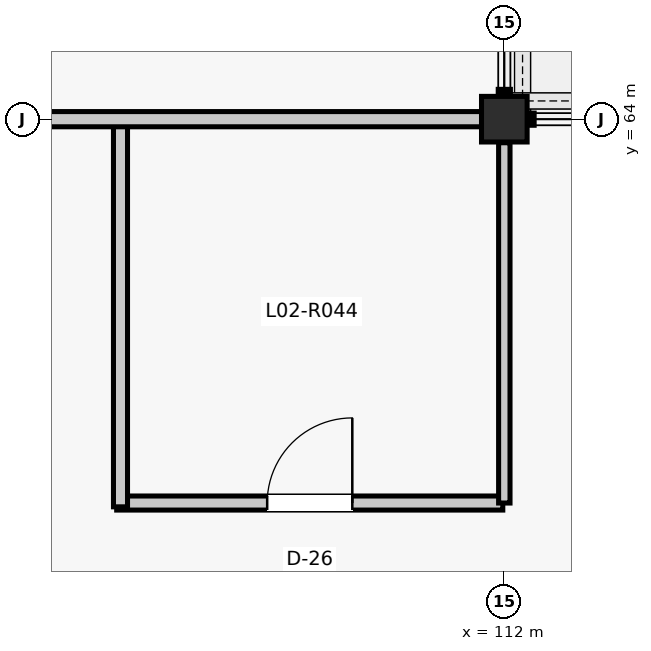
"""IFC4 building model, lengths in metres.
Left out: names, types, materials, properties, quantities, classifications, styles, units other than length and angle.
Written with IfcOpenShell. Run it as: python <this file> out.ifc"""

import sys

from ifc_helpers import new_model, si_unit, direction, frame, frame_2d, origin, origin_2d, place, context, subcontext, project, spatial, rectangle, extrude, element, fill, save


model = new_model("IFC4")
c1 = context("Model", 3, precision=1e-05, world=origin(), true_north=direction((0.0, 1.0)))
c2 = subcontext(c1, "Body", "Model", "MODEL_VIEW")
j1 = project(units=[si_unit("LENGTHUNIT", "METRE"), si_unit("PLANEANGLEUNIT", "RADIAN")], contexts=[c1])
p1 = place(None, origin())
s1 = spatial("IfcSite", under=j1, at=p1, CompositionType="ELEMENT")
p2 = place(p1, origin())
s2 = spatial("IfcBuilding", under=s1, at=p2, CompositionType="ELEMENT")
p3 = place(p2, frame((0.0, 0.0, 9.9)))
s3 = spatial("IfcBuildingStorey", under=s2, at=p3, CompositionType="ELEMENT", Elevation=9.9)
p4 = place(p3, frame((112.0, 64.0, 0.0), z_axis=(0.0, 0.0, 1.0), x_axis=(1.0, 0.0, 0.0)))
e1 = element("IfcColumn", 1, at=p4, inside=s3, PredefinedType="COLUMN", context=c2, shape_type="SweptSolid", body=[
    extrude(rectangle(XDim=0.6, YDim=0.6, at=origin_2d()), origin(), (0.0, 0.0, 1.0), 3.96),
])
p5 = place(p3, frame((106.9, 58.95, 0.0), z_axis=(0.0, 0.0, 1.0), x_axis=(1.0, 0.0, 0.0)))
e2 = element("IfcWall", 2, at=p5, inside=s3, PredefinedType="PARTITIONING", context=c2, shape_type="SweptSolid", body=[
    extrude(rectangle(XDim=5.08, YDim=0.185, at=frame_2d((2.54, 0.0))), origin(), (0.0, 0.0, 1.0), 3.227),
])
p6 = place(p5, frame((1.98, 0.0, 0.0)))
e3 = element("IfcOpeningElement", 3, at=p6, cuts=e2, PredefinedType="OPENING", context=c2, shape_type="SweptSolid", body=[
    extrude(rectangle(XDim=1.12, YDim=2.22, at=frame_2d((0.56, 1.11))), frame((0.0, 0.103, 0.0), z_axis=(0.0, -1.0, 0.0), x_axis=(1.0, 0.0, 0.0)), (0.0, 0.0, 1.0), 0.205),
])
p7 = place(p3, frame((106.95, 58.9, 0.0), z_axis=(0.0, 0.0, 1.0), x_axis=(0.0, 1.0, 0.0)))
e4 = element("IfcWall", 4, at=p7, inside=s3, PredefinedType="PARTITIONING", context=c2, shape_type="SweptSolid", body=[
    extrude(rectangle(XDim=5.08, YDim=0.185, at=frame_2d((2.54, 0.0))), origin(), (0.0, 0.0, 1.0), 3.157),
])
p8 = place(p3, frame((112.0, 58.95, 0.0), z_axis=(0.0, 0.0, 1.0), x_axis=(0.0, 1.0, 0.0)))
e5 = element("IfcWall", 5, at=p8, inside=s3, PredefinedType="PARTITIONING", context=c2, shape_type="SweptSolid", body=[
    extrude(rectangle(XDim=4.74, YDim=0.15, at=frame_2d((2.37, 0.0))), origin(), (0.0, 0.0, 1.0), 3.227),
])
p9 = place(p3, frame((104.39, 64.0, 0.0), z_axis=(0.0, 0.0, 1.0), x_axis=(1.0, 0.0, 0.0)))
e6 = element("IfcWall", 6, at=p9, inside=s3, PredefinedType="PARTITIONING", context=c2, shape_type="SweptSolid", body=[
    extrude(rectangle(XDim=7.32, YDim=0.2, at=frame_2d((3.66, 0.0))), origin(), (0.0, 0.0, 1.0), 3.157),
])
p10 = place(p9, frame((0.52, 0.0, 0.0)))
e7 = element("IfcOpeningElement", 7, at=p10, cuts=e6, PredefinedType="OPENING", context=c2, shape_type="SweptSolid", body=[
    extrude(rectangle(XDim=0.94, YDim=2.12, at=frame_2d((0.47, 1.06))), frame((0.0, 0.11, 0.0), z_axis=(0.0, -1.0, 0.0), x_axis=(1.0, 0.0, 0.0)), (0.0, 0.0, 1.0), 0.22),
])
p11 = place(p6, origin())
e8 = element("IfcDoor", 8, at=p11, inside=s3, OperationType="SINGLE_SWING_RIGHT", PredefinedType="DOOR", context=c2, shape_type="SweptSolid", body=[
    extrude(rectangle(XDim=1.12, YDim=2.22, at=frame_2d((0.56, 1.11))), frame((0.0, 0.025, 0.0), z_axis=(0.0, -1.0, 0.0), x_axis=(1.0, 0.0, 0.0)), (0.0, 0.0, 1.0), 0.05),
])
fill(e3, e8)
save(model, sys.argv[1])
